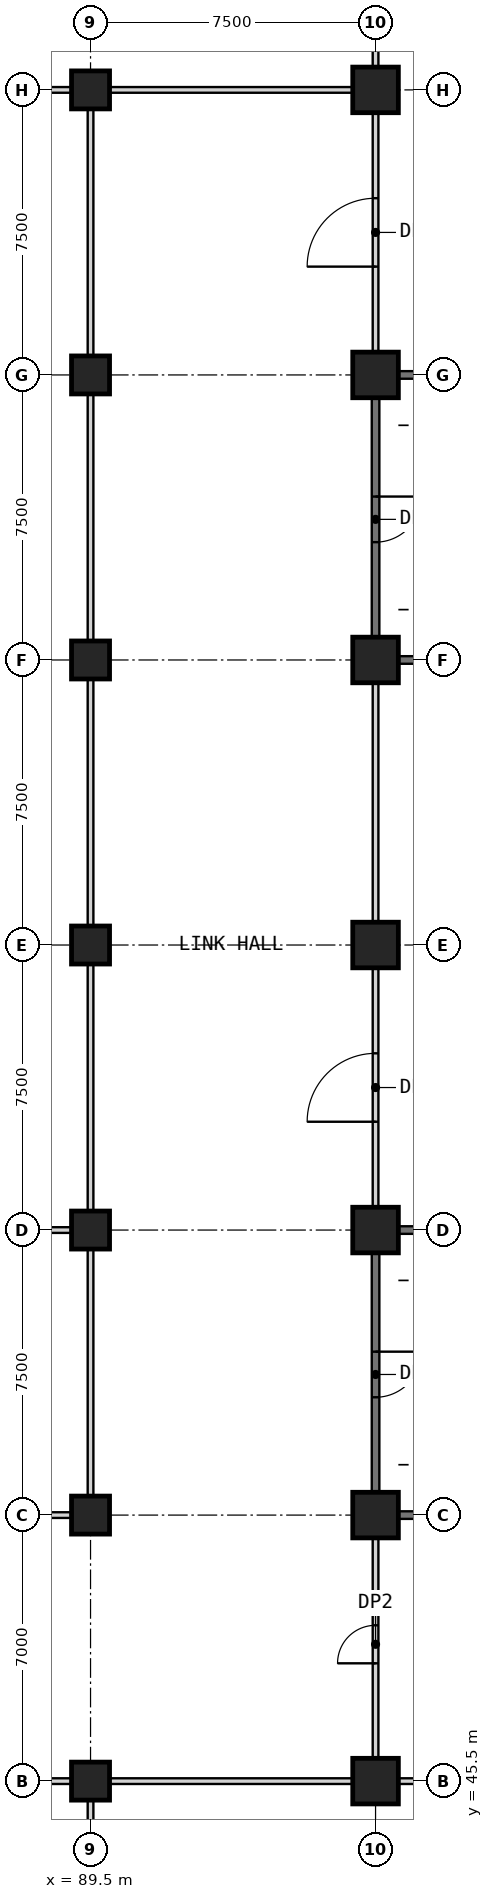
"""IFC4 building model, lengths in metres.
Left out: names, types, materials, properties, quantities, classifications, styles, units other than length and angle.
Written with IfcOpenShell. Run it as: python <this file> out.ifc"""

import sys

from ifc_helpers import new_model, si_unit, direction, frame, frame_2d, origin, origin_2d, place, context, subcontext, project, spatial, rectangle, extrude, element, fill, save


model = new_model("IFC4")
c1 = context("Model", 3, precision=1e-05, world=origin(), true_north=direction((0.0, 1.0)))
c2 = subcontext(c1, "Body", "Model", "MODEL_VIEW")
j1 = project(units=[si_unit("LENGTHUNIT", "METRE"), si_unit("PLANEANGLEUNIT", "RADIAN")], contexts=[c1])
p1 = place(None, origin())
s1 = spatial("IfcSite", under=j1, at=p1, CompositionType="ELEMENT")
p2 = place(p1, origin())
s2 = spatial("IfcBuilding", under=s1, at=p2, CompositionType="ELEMENT")
p3 = place(p2, frame((0.0, 0.0, 18.5)))
s3 = spatial("IfcBuildingStorey", under=s2, at=p3, CompositionType="ELEMENT", Elevation=18.5)
for number, where, z_axis, x_axis in (
    (1, (89.5, 45.5, 0.0), (0.0, 0.0, 1.0), (1.0, 0.0, 0.0)),
    (2, (89.5, 52.5, 0.0), (0.0, 0.0, 1.0), (1.0, 0.0, 0.0)),
    (3, (89.5, 60.0, 0.0), (0.0, 0.0, 1.0), (1.0, 0.0, 0.0)),
    (4, (89.5, 67.5, 0.0), (0.0, 0.0, 1.0), (1.0, 0.0, 0.0)),
    (5, (89.5, 75.0, 0.0), (0.0, 0.0, 1.0), (1.0, 0.0, 0.0)),
    (6, (89.5, 82.5, 0.0), (0.0, 0.0, 1.0), (1.0, 0.0, 0.0)),
    (7, (89.5, 90.0, 0.0), (0.0, 0.0, 1.0), (1.0, 0.0, 0.0)),
):
    element("IfcColumn", number, at=place(p3, frame(where, z_axis=z_axis, x_axis=x_axis)), inside=s3, PredefinedType="COLUMN", context=c2, shape_type="SweptSolid", body=[
        extrude(rectangle(XDim=1.0, YDim=1.0, at=origin_2d()), origin(), (0.0, 0.0, 1.0), 5.0),
    ])
for number, where, z_axis, x_axis in (
    (8, (97.0, 45.5, 0.0), (0.0, 0.0, 1.0), (1.0, 0.0, 0.0)),
    (9, (97.0, 52.5, 0.0), (0.0, 0.0, 1.0), (1.0, 0.0, 0.0)),
    (10, (97.0, 60.0, 0.0), (0.0, 0.0, 1.0), (1.0, 0.0, 0.0)),
    (11, (97.0, 67.5, 0.0), (0.0, 0.0, 1.0), (1.0, 0.0, 0.0)),
    (12, (97.0, 75.0, 0.0), (0.0, 0.0, 1.0), (1.0, 0.0, 0.0)),
    (13, (97.0, 82.5, 0.0), (0.0, 0.0, 1.0), (1.0, 0.0, 0.0)),
    (14, (97.0, 90.0, 0.0), (0.0, 0.0, 1.0), (1.0, 0.0, 0.0)),
):
    element("IfcColumn", number, at=place(p3, frame(where, z_axis=z_axis, x_axis=x_axis)), inside=s3, PredefinedType="COLUMN", context=c2, shape_type="SweptSolid", body=[
        extrude(rectangle(XDim=1.2, YDim=1.2, at=origin_2d()), origin(), (0.0, 0.0, 1.0), 5.0),
    ])
for number, where, z_axis, x_axis in (
    (15, (82.6, 45.5, 0.0), (0.0, 0.0, 1.0), (1.0, 0.0, 0.0)),
    (16, (90.0, 45.5, 0.0), (0.0, 0.0, 1.0), (1.0, 0.0, 0.0)),
):
    element("IfcWall", number, at=place(p3, frame(where, z_axis=z_axis, x_axis=x_axis)), inside=s3, PredefinedType="PARTITIONING", context=c2, shape_type="SweptSolid", body=[
        extrude(rectangle(XDim=6.4, YDim=0.15, at=frame_2d((3.2, 0.0))), origin(), (0.0, 0.0, 1.0), 4.7),
    ])
p4 = place(p3, frame((97.6, 45.5, 0.0), z_axis=(0.0, 0.0, 1.0), x_axis=(1.0, 0.0, 0.0)))
e17 = element("IfcWall", 17, at=p4, inside=s3, PredefinedType="PARTITIONING", context=c2, shape_type="SweptSolid", body=[
    extrude(rectangle(XDim=6.3, YDim=0.15, at=frame_2d((3.15, 0.0))), origin(), (0.0, 0.0, 1.0), 4.7),
])
p5 = place(p4, frame((2.25, 0.0, 0.0)))
e18 = element("IfcOpeningElement", 18, at=p5, cuts=e17, PredefinedType="OPENING", context=c2, shape_type="SweptSolid", body=[
    extrude(rectangle(XDim=1.8, YDim=2.4, at=frame_2d((0.9, 1.2))), frame((0.0, 0.085, 0.0), z_axis=(0.0, -1.0, 0.0), x_axis=(1.0, 0.0, 0.0)), (0.0, 0.0, 1.0), 0.17),
])
p6 = place(p3, frame((89.0, 52.5, 0.0), z_axis=(0.0, 0.0, 1.0), x_axis=(-1.0, 0.0, 0.0)))
e19 = element("IfcWall", 19, at=p6, inside=s3, PredefinedType="PARTITIONING", context=c2, shape_type="SweptSolid", body=[
    extrude(rectangle(XDim=6.4, YDim=0.15, at=frame_2d((3.2, 0.0))), origin(), (0.0, 0.0, 1.0), 4.7),
])
p7 = place(p6, frame((4.1, 0.0, 0.0)))
e20 = element("IfcOpeningElement", 20, at=p7, cuts=e19, PredefinedType="OPENING", context=c2, shape_type="SweptSolid", body=[
    extrude(rectangle(XDim=1.8, YDim=2.4, at=frame_2d((0.9, 1.2))), frame((0.0, 0.085, 0.0), z_axis=(0.0, -1.0, 0.0), x_axis=(1.0, 0.0, 0.0)), (0.0, 0.0, 1.0), 0.17),
])
p8 = place(p3, frame((97.6, 52.5, 0.0), z_axis=(0.0, 0.0, 1.0), x_axis=(1.0, 0.0, 0.0)))
e21 = element("IfcWall", 21, at=p8, inside=s3, PredefinedType="SHEAR", context=c2, shape_type="SweptSolid", body=[
    extrude(rectangle(XDim=6.3, YDim=0.2, at=frame_2d((3.15, 0.0))), origin(), (0.0, 0.0, 1.0), 4.7),
])
p9 = place(p3, frame((82.6, 60.0, 0.0), z_axis=(0.0, 0.0, 1.0), x_axis=(1.0, 0.0, 0.0)))
e22 = element("IfcWall", 22, at=p9, inside=s3, PredefinedType="PARTITIONING", context=c2, shape_type="SweptSolid", body=[
    extrude(rectangle(XDim=6.4, YDim=0.15, at=frame_2d((3.2, 0.0))), origin(), (0.0, 0.0, 1.0), 4.7),
])
for number, where, z_axis, x_axis in (
    (23, (97.6, 60.0, 0.0), (0.0, 0.0, 1.0), (1.0, 0.0, 0.0)),
    (24, (97.6, 75.0, 0.0), (0.0, 0.0, 1.0), (1.0, 0.0, 0.0)),
    (25, (97.6, 82.5, 0.0), (0.0, 0.0, 1.0), (1.0, 0.0, 0.0)),
):
    element("IfcWall", number, at=place(p3, frame(where, z_axis=z_axis, x_axis=x_axis)), inside=s3, PredefinedType="SHEAR", context=c2, shape_type="SweptSolid", body=[
        extrude(rectangle(XDim=6.3, YDim=0.2, at=frame_2d((3.15, 0.0))), origin(), (0.0, 0.0, 1.0), 4.7),
    ])
for number, where, z_axis, x_axis in (
    (26, (82.6, 90.0, 0.0), (0.0, 0.0, 1.0), (1.0, 0.0, 0.0)),
    (27, (90.0, 90.0, 0.0), (0.0, 0.0, 1.0), (1.0, 0.0, 0.0)),
):
    element("IfcWall", number, at=place(p3, frame(where, z_axis=z_axis, x_axis=x_axis)), inside=s3, PredefinedType="PARTITIONING", context=c2, shape_type="SweptSolid", body=[
        extrude(rectangle(XDim=6.4, YDim=0.15, at=frame_2d((3.2, 0.0))), origin(), (0.0, 0.0, 1.0), 4.7),
    ])
p10 = place(p3, frame((97.0, 46.1, 0.0), z_axis=(0.0, 0.0, 1.0), x_axis=(0.0, 1.0, 0.0)))
e28 = element("IfcWall", 28, at=p10, inside=s3, PredefinedType="PARTITIONING", context=c2, shape_type="SweptSolid", body=[
    extrude(rectangle(XDim=5.8, YDim=0.15, at=frame_2d((2.9, 0.0))), origin(), (0.0, 0.0, 1.0), 4.7),
])
p11 = place(p10, frame((2.5, 0.0, 0.0)))
e29 = element("IfcOpeningElement", 29, at=p11, cuts=e28, PredefinedType="OPENING", context=c2, shape_type="SweptSolid", body=[
    extrude(rectangle(XDim=1.0, YDim=2.1, at=frame_2d((0.5, 1.05))), frame((0.0, 0.085, 0.0), z_axis=(0.0, -1.0, 0.0), x_axis=(1.0, 0.0, 0.0)), (0.0, 0.0, 1.0), 0.17),
])
p12 = place(p3, frame((97.0, 59.4, 0.0), z_axis=(0.0, 0.0, 1.0), x_axis=(0.0, -1.0, 0.0)))
e30 = element("IfcWall", 30, at=p12, inside=s3, PredefinedType="SHEAR", context=c2, shape_type="SweptSolid", body=[
    extrude(rectangle(XDim=6.3, YDim=0.2, at=frame_2d((3.15, 0.0))), origin(), (0.0, 0.0, 1.0), 4.7),
])
p13 = place(p12, frame((2.6, 0.0, 0.0)))
e31 = element("IfcOpeningElement", 31, at=p13, cuts=e30, PredefinedType="OPENING", context=c2, shape_type="SweptSolid", body=[
    extrude(rectangle(XDim=1.2, YDim=2.1, at=frame_2d((0.6, 1.05))), frame((0.0, 0.11, 0.0), z_axis=(0.0, -1.0, 0.0), x_axis=(1.0, 0.0, 0.0)), (0.0, 0.0, 1.0), 0.22),
])
p14 = place(p3, frame((97.0, 60.6, 0.0), z_axis=(0.0, 0.0, 1.0), x_axis=(0.0, 1.0, 0.0)))
e32 = element("IfcWall", 32, at=p14, inside=s3, PredefinedType="PARTITIONING", context=c2, shape_type="SweptSolid", body=[
    extrude(rectangle(XDim=6.3, YDim=0.15, at=frame_2d((3.15, 0.0))), origin(), (0.0, 0.0, 1.0), 4.7),
])
p15 = place(p14, frame((2.25, 0.0, 0.0)))
e33 = element("IfcOpeningElement", 33, at=p15, cuts=e32, PredefinedType="OPENING", context=c2, shape_type="SweptSolid", body=[
    extrude(rectangle(XDim=1.8, YDim=2.4, at=frame_2d((0.9, 1.2))), frame((0.0, 0.085, 0.0), z_axis=(0.0, -1.0, 0.0), x_axis=(1.0, 0.0, 0.0)), (0.0, 0.0, 1.0), 0.17),
])
p16 = place(p3, frame((97.0, 68.1, 0.0), z_axis=(0.0, 0.0, 1.0), x_axis=(0.0, 1.0, 0.0)))
e34 = element("IfcWall", 34, at=p16, inside=s3, PredefinedType="PARTITIONING", context=c2, shape_type="SweptSolid", body=[
    extrude(rectangle(XDim=6.3, YDim=0.15, at=frame_2d((3.15, 0.0))), origin(), (0.0, 0.0, 1.0), 4.7),
])
p17 = place(p3, frame((97.0, 81.9, 0.0), z_axis=(0.0, 0.0, 1.0), x_axis=(0.0, -1.0, 0.0)))
e35 = element("IfcWall", 35, at=p17, inside=s3, PredefinedType="SHEAR", context=c2, shape_type="SweptSolid", body=[
    extrude(rectangle(XDim=6.3, YDim=0.2, at=frame_2d((3.15, 0.0))), origin(), (0.0, 0.0, 1.0), 4.7),
])
p18 = place(p17, frame((2.6, 0.0, 0.0)))
e36 = element("IfcOpeningElement", 36, at=p18, cuts=e35, PredefinedType="OPENING", context=c2, shape_type="SweptSolid", body=[
    extrude(rectangle(XDim=1.2, YDim=2.1, at=frame_2d((0.6, 1.05))), frame((0.0, 0.11, 0.0), z_axis=(0.0, -1.0, 0.0), x_axis=(1.0, 0.0, 0.0)), (0.0, 0.0, 1.0), 0.22),
])
p19 = place(p3, frame((97.0, 83.1, 0.0), z_axis=(0.0, 0.0, 1.0), x_axis=(0.0, 1.0, 0.0)))
e37 = element("IfcWall", 37, at=p19, inside=s3, PredefinedType="PARTITIONING", context=c2, shape_type="SweptSolid", body=[
    extrude(rectangle(XDim=6.3, YDim=0.15, at=frame_2d((3.15, 0.0))), origin(), (0.0, 0.0, 1.0), 4.7),
])
p20 = place(p19, frame((2.25, 0.0, 0.0)))
e38 = element("IfcOpeningElement", 38, at=p20, cuts=e37, PredefinedType="OPENING", context=c2, shape_type="SweptSolid", body=[
    extrude(rectangle(XDim=1.8, YDim=2.4, at=frame_2d((0.9, 1.2))), frame((0.0, 0.085, 0.0), z_axis=(0.0, -1.0, 0.0), x_axis=(1.0, 0.0, 0.0)), (0.0, 0.0, 1.0), 0.17),
])
p21 = place(p3, frame((97.0, 90.6, 0.0), z_axis=(0.0, 0.0, 1.0), x_axis=(0.0, 1.0, 0.0)))
e39 = element("IfcWall", 39, at=p21, inside=s3, PredefinedType="PARTITIONING", context=c2, shape_type="SweptSolid", body=[
    extrude(rectangle(XDim=5.8, YDim=0.15, at=frame_2d((2.9, 0.0))), origin(), (0.0, 0.0, 1.0), 4.7),
])
p22 = place(p3, frame((89.5, 38.6, 0.0), z_axis=(0.0, 0.0, 1.0), x_axis=(0.0, 1.0, 0.0)))
e40 = element("IfcWall", 40, at=p22, inside=s3, PredefinedType="PARTITIONING", context=c2, shape_type="SweptSolid", body=[
    extrude(rectangle(XDim=6.4, YDim=0.15, at=frame_2d((3.2, 0.0))), origin(), (0.0, 0.0, 1.0), 4.7),
])
for number, where, z_axis, x_axis in (
    (41, (89.5, 53.0, 0.0), (0.0, 0.0, 1.0), (0.0, 1.0, 0.0)),
    (42, (89.5, 60.5, 0.0), (0.0, 0.0, 1.0), (0.0, 1.0, 0.0)),
    (43, (89.5, 68.0, 0.0), (0.0, 0.0, 1.0), (0.0, 1.0, 0.0)),
    (44, (89.5, 75.5, 0.0), (0.0, 0.0, 1.0), (0.0, 1.0, 0.0)),
    (45, (89.5, 83.0, 0.0), (0.0, 0.0, 1.0), (0.0, 1.0, 0.0)),
):
    element("IfcWall", number, at=place(p3, frame(where, z_axis=z_axis, x_axis=x_axis)), inside=s3, PredefinedType="PARTITIONING", context=c2, shape_type="SweptSolid", body=[
        extrude(rectangle(XDim=6.5, YDim=0.15, at=frame_2d((3.25, 0.0))), origin(), (0.0, 0.0, 1.0), 4.7),
    ])
p23 = place(p11, origin())
e46 = element("IfcDoor", 46, at=p23, inside=s3, OperationType="SINGLE_SWING_LEFT", PredefinedType="DOOR", context=c2, shape_type="SweptSolid", body=[
    extrude(rectangle(XDim=1.0, YDim=2.1, at=frame_2d((0.5, 1.05))), frame((0.0, 0.025, 0.0), z_axis=(0.0, -1.0, 0.0), x_axis=(1.0, 0.0, 0.0)), (0.0, 0.0, 1.0), 0.05),
])
fill(e29, e46)
p24 = place(p13, origin())
e47 = element("IfcDoor", 47, at=p24, inside=s3, OperationType="SINGLE_SWING_LEFT", PredefinedType="DOOR", context=c2, shape_type="SweptSolid", body=[
    extrude(rectangle(XDim=1.2, YDim=2.1, at=frame_2d((0.6, 1.05))), frame((0.0, 0.025, 0.0), z_axis=(0.0, -1.0, 0.0), x_axis=(1.0, 0.0, 0.0)), (0.0, 0.0, 1.0), 0.05),
])
fill(e31, e47)
p25 = place(p15, origin())
e48 = element("IfcDoor", 48, at=p25, inside=s3, OperationType="SINGLE_SWING_LEFT", PredefinedType="DOOR", context=c2, shape_type="SweptSolid", body=[
    extrude(rectangle(XDim=1.8, YDim=2.4, at=frame_2d((0.9, 1.2))), frame((0.0, 0.025, 0.0), z_axis=(0.0, -1.0, 0.0), x_axis=(1.0, 0.0, 0.0)), (0.0, 0.0, 1.0), 0.05),
])
fill(e33, e48)
p26 = place(p18, origin())
e49 = element("IfcDoor", 49, at=p26, inside=s3, OperationType="SINGLE_SWING_LEFT", PredefinedType="DOOR", context=c2, shape_type="SweptSolid", body=[
    extrude(rectangle(XDim=1.2, YDim=2.1, at=frame_2d((0.6, 1.05))), frame((0.0, 0.025, 0.0), z_axis=(0.0, -1.0, 0.0), x_axis=(1.0, 0.0, 0.0)), (0.0, 0.0, 1.0), 0.05),
])
fill(e36, e49)
p27 = place(p20, origin())
e50 = element("IfcDoor", 50, at=p27, inside=s3, OperationType="SINGLE_SWING_LEFT", PredefinedType="DOOR", context=c2, shape_type="SweptSolid", body=[
    extrude(rectangle(XDim=1.8, YDim=2.4, at=frame_2d((0.9, 1.2))), frame((0.0, 0.025, 0.0), z_axis=(0.0, -1.0, 0.0), x_axis=(1.0, 0.0, 0.0)), (0.0, 0.0, 1.0), 0.05),
])
fill(e38, e50)
save(model, sys.argv[1])
